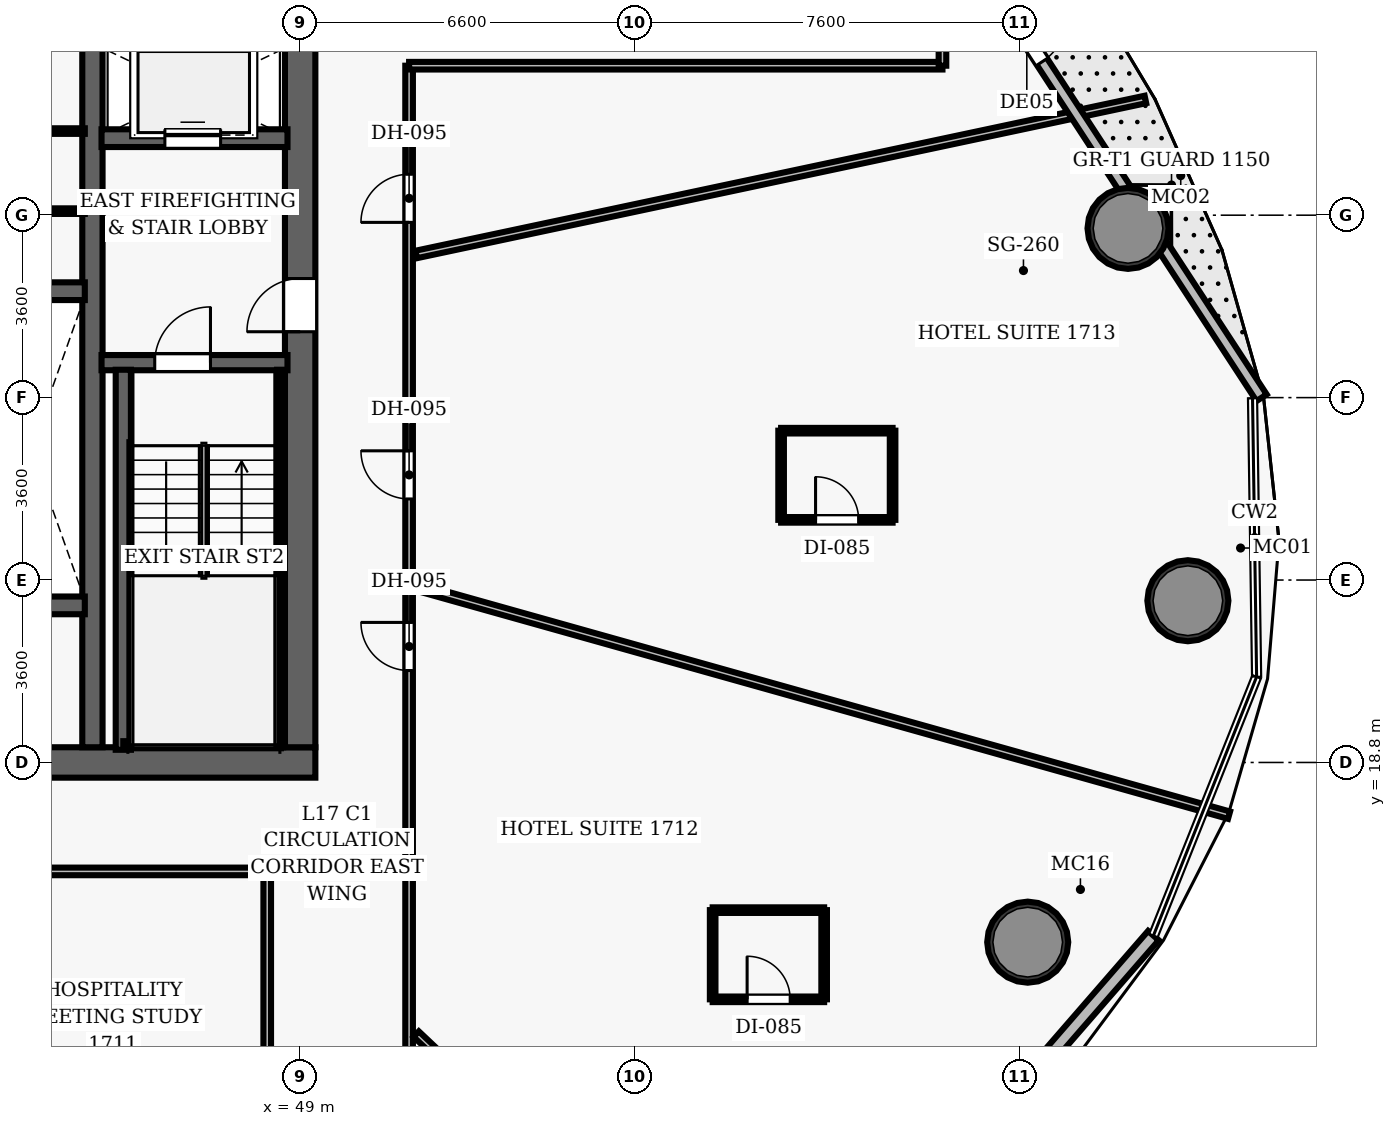
"""IFC4 building model, lengths in metres.
Left out: names, types, materials, properties, quantities, classifications, styles, units other than length and angle.
Written with IfcOpenShell. Run it as: python <this file> out.ifc"""

import sys

from ifc_helpers import new_model, si_unit, direction, frame, frame_2d, origin, origin_2d, place, context, subcontext, project, spatial, rectangle, hollow_circle, extrude, element, fill, save


model = new_model("IFC4")
c1 = context("Model", 3, precision=1e-05, world=origin(), true_north=direction((0.0, 1.0)))
c2 = subcontext(c1, "Body", "Model", "MODEL_VIEW")
j1 = project(units=[si_unit("LENGTHUNIT", "METRE"), si_unit("PLANEANGLEUNIT", "RADIAN")], contexts=[c1])
p1 = place(None, origin())
s1 = spatial("IfcSite", under=j1, at=p1, CompositionType="ELEMENT")
p2 = place(p1, origin())
s2 = spatial("IfcBuilding", under=s1, at=p2, CompositionType="ELEMENT")
p3 = place(p2, frame((0.0, 0.0, 76.4)))
s3 = spatial("IfcBuildingStorey", under=s2, at=p3, CompositionType="ELEMENT", Elevation=76.4)
p4 = place(p3, frame((26.7, 18.8, 0.0), z_axis=(0.0, 0.0, 1.0), x_axis=(1.0, 0.0, 0.0)))
e1 = element("IfcWall", 1, at=p4, inside=s3, PredefinedType="SHEAR", context=c2, shape_type="SweptSolid", body=[
    extrude(rectangle(XDim=22.6, YDim=0.6, at=frame_2d((11.3, 0.0))), origin(), (0.0, 0.0, 1.0), 3.5),
])
p5 = place(p4, frame((14.52, 0.0, 0.0)))
e2 = element("IfcOpeningElement", 2, at=p5, cuts=e1, PredefinedType="OPENING", context=c2, shape_type="SweptSolid", body=[
    extrude(rectangle(XDim=1.05, YDim=2.15, at=frame_2d((0.525, 1.075))), frame((0.0, 0.31, 0.0), z_axis=(0.0, -1.0, 0.0), x_axis=(1.0, 0.0, 0.0)), (0.0, 0.0, 1.0), 0.62),
])
p6 = place(p3, frame((49.0, 19.1, 0.0), z_axis=(0.0, 0.0, 1.0), x_axis=(0.0, 1.0, 0.0)))
e3 = element("IfcWall", 3, at=p6, inside=s3, PredefinedType="SHEAR", context=c2, shape_type="SweptSolid", body=[
    extrude(rectangle(XDim=13.8, YDim=0.6, at=frame_2d((6.9, 0.0))), origin(), (0.0, 0.0, 1.0), 3.5),
])
p7 = place(p6, frame((8.2, 0.0, 0.0)))
e4 = element("IfcOpeningElement", 4, at=p7, cuts=e3, PredefinedType="OPENING", context=c2, shape_type="SweptSolid", body=[
    extrude(rectangle(XDim=1.05, YDim=2.15, at=frame_2d((0.525, 1.075))), frame((0.0, 0.31, 0.0), z_axis=(0.0, -1.0, 0.0), x_axis=(1.0, 0.0, 0.0)), (0.0, 0.0, 1.0), 0.62),
])
p8 = place(p3, frame((44.9, 19.1, 0.0), z_axis=(0.0, 0.0, 1.0), x_axis=(0.0, 1.0, 0.0)))
e5 = element("IfcWall", 5, at=p8, inside=s3, PredefinedType="SHEAR", context=c2, shape_type="SweptSolid", body=[
    extrude(rectangle(XDim=13.8, YDim=0.4, at=frame_2d((6.9, 0.0))), origin(), (0.0, 0.0, 1.0), 3.5),
])
for number, where, z_axis, x_axis in (
    (6, (66.52, 21.992, 0.0), (0.0, 0.0, 1.0), (1.0, 0.0, 0.0)),
    (7, (65.339, 29.34, 0.0), (0.0, 0.0, 1.0), (1.0, 0.0, 0.0)),
    (8, (63.359, 15.254, 0.0), (0.0, 0.0, 1.0), (1.0, 0.0, 0.0)),
):
    element("IfcColumn", number, at=place(p3, frame(where, z_axis=z_axis, x_axis=x_axis)), inside=s3, PredefinedType="COLUMN", context=c2, shape_type="SweptSolid", body=[
        extrude(hollow_circle(Radius=0.8, WallThickness=0.06, at=origin_2d()), origin(), (0.0, 0.0, 1.0), 3.5),
    ])
p9 = place(p3, frame((45.08, 26.69, 0.0), z_axis=(0.0, 0.0, 1.0), x_axis=(1.0, 0.0, 0.0)))
e9 = element("IfcWall", 9, at=p9, inside=s3, PredefinedType="SHEAR", context=c2, shape_type="SweptSolid", body=[
    extrude(rectangle(XDim=3.67, YDim=0.3, at=frame_2d((1.835, 0.0))), origin(), (0.0, 0.0, 1.0), 3.5),
])
p10 = place(p9, frame((1.05, 0.0, 0.0)))
e10 = element("IfcOpeningElement", 10, at=p10, cuts=e9, PredefinedType="OPENING", context=c2, shape_type="SweptSolid", body=[
    extrude(rectangle(XDim=1.1, YDim=2.15, at=frame_2d((0.55, 1.075))), frame((0.0, 0.16, 0.0), z_axis=(0.0, -1.0, 0.0), x_axis=(1.0, 0.0, 0.0)), (0.0, 0.0, 1.0), 0.32),
])
p11 = place(p3, frame((45.51, 19.05, 0.0), z_axis=(0.0, 0.0, 1.0), x_axis=(0.0, 1.0, 0.0)))
e11 = element("IfcWall", 11, at=p11, inside=s3, PredefinedType="SHEAR", context=c2, shape_type="SweptSolid", body=[
    extrude(rectangle(XDim=7.5, YDim=0.3, at=frame_2d((3.75, 0.0))), origin(), (0.0, 0.0, 1.0), 3.5),
])
p12 = place(p3, frame((48.605, 19.1, 0.0), z_axis=(0.0, 0.0, 1.0), x_axis=(0.0, 1.0, 0.0)))
e12 = element("IfcWall", 12, at=p12, inside=s3, PredefinedType="SHEAR", context=c2, shape_type="SweptSolid", body=[
    extrude(rectangle(XDim=7.45, YDim=0.12, at=frame_2d((3.725, 0.0))), origin(), (0.0, 0.0, 1.0), 3.5),
])
p13 = place(p3, frame((45.51, 19.16, 0.0), z_axis=(0.0, 0.0, 1.0), x_axis=(1.0, 0.0, 0.0)))
e13 = element("IfcWall", 13, at=p13, inside=s3, PredefinedType="SHEAR", context=c2, shape_type="SweptSolid", body=[
    extrude(rectangle(XDim=3.095, YDim=0.12, at=frame_2d((1.547, 0.0))), origin(), (0.0, 0.0, 1.0), 3.5),
])
p14 = place(p3, frame((45.08, 31.12, 0.0), z_axis=(0.0, 0.0, 1.0), x_axis=(1.0, 0.0, 0.0)))
e14 = element("IfcWall", 14, at=p14, inside=s3, PredefinedType="SHEAR", context=c2, shape_type="SweptSolid", body=[
    extrude(rectangle(XDim=3.67, YDim=0.35, at=frame_2d((1.835, 0.0))), origin(), (0.0, 0.0, 1.0), 2.6),
])
p15 = place(p14, frame((1.25, 0.0, 0.0)))
e15 = element("IfcOpeningElement", 15, at=p15, cuts=e14, PredefinedType="OPENING", context=c2, shape_type="SweptSolid", body=[
    extrude(rectangle(XDim=1.1, YDim=2.15, at=frame_2d((0.55, 1.075))), frame((0.0, 0.185, 0.0), z_axis=(0.0, -1.0, 0.0), x_axis=(1.0, 0.0, 0.0)), (0.0, 0.0, 1.0), 0.37),
])
for number, where, z_axis, x_axis in (
    (16, (42.72, 21.9, 0.0), (0.0, 0.0, 1.0), (1.0, 0.0, 0.0)),
    (17, (42.72, 28.1, 0.0), (0.0, 0.0, 1.0), (1.0, 0.0, 0.0)),
):
    element("IfcWall", number, at=place(p3, frame(where, z_axis=z_axis, x_axis=x_axis)), inside=s3, PredefinedType="SHEAR", context=c2, shape_type="SweptSolid", body=[
        extrude(rectangle(XDim=2.03, YDim=0.35, at=frame_2d((1.015, 0.0))), origin(), (0.0, 0.0, 1.0), 2.6),
    ])
for number, where, z_axis, x_axis in (
    (18, (42.55, 29.68, 0.0), (0.0, 0.0, 1.0), (1.0, 0.0, 0.0)),
    (19, (42.55, 31.26, 0.0), (0.0, 0.0, 1.0), (1.0, 0.0, 0.0)),
):
    element("IfcWall", number, at=place(p3, frame(where, z_axis=z_axis, x_axis=x_axis)), inside=s3, PredefinedType="PARTITIONING", context=c2, shape_type="SweptSolid", body=[
        extrude(rectangle(XDim=2.2, YDim=0.11, at=frame_2d((1.1, 0.0))), origin(), (0.0, 0.0, 1.0), 2.6),
    ])
p16 = place(p3, frame((24.85, 16.65, 0.0), z_axis=(0.0, 0.0, 1.0), x_axis=(1.0, 0.0, 0.0)))
e20 = element("IfcWall", 20, at=p16, inside=s3, PredefinedType="PARTITIONING", context=c2, shape_type="SweptSolid", body=[
    extrude(rectangle(XDim=23.5, YDim=0.15, at=frame_2d((11.75, 0.0))), origin(), (0.0, 0.0, 1.0), 2.6),
])
p17 = place(p16, frame((4.362, 0.0, 0.0)))
e21 = element("IfcOpeningElement", 21, at=p17, cuts=e20, PredefinedType="OPENING", context=c2, shape_type="SweptSolid", body=[
    extrude(rectangle(XDim=0.95, YDim=2.15, at=frame_2d((0.475, 1.075))), frame((0.0, 0.085, 0.0), z_axis=(0.0, -1.0, 0.0), x_axis=(1.0, 0.0, 0.0)), (0.0, 0.0, 1.0), 0.17),
])
p18 = place(p16, frame((8.439, 0.0, 0.0)))
e22 = element("IfcOpeningElement", 22, at=p18, cuts=e20, PredefinedType="OPENING", context=c2, shape_type="SweptSolid", body=[
    extrude(rectangle(XDim=0.95, YDim=2.15, at=frame_2d((0.475, 1.075))), frame((0.0, 0.085, 0.0), z_axis=(0.0, -1.0, 0.0), x_axis=(1.0, 0.0, 0.0)), (0.0, 0.0, 1.0), 0.17),
])
p19 = place(p16, frame((14.893, 0.0, 0.0)))
e23 = element("IfcOpeningElement", 23, at=p19, cuts=e20, PredefinedType="OPENING", context=c2, shape_type="SweptSolid", body=[
    extrude(rectangle(XDim=0.95, YDim=2.15, at=frame_2d((0.475, 1.075))), frame((0.0, 0.085, 0.0), z_axis=(0.0, -1.0, 0.0), x_axis=(1.0, 0.0, 0.0)), (0.0, 0.0, 1.0), 0.17),
])
p20 = place(p16, frame((17.475, 0.0, 0.0)))
e24 = element("IfcOpeningElement", 24, at=p20, cuts=e20, PredefinedType="OPENING", context=c2, shape_type="SweptSolid", body=[
    extrude(rectangle(XDim=0.95, YDim=2.15, at=frame_2d((0.475, 1.075))), frame((0.0, 0.085, 0.0), z_axis=(0.0, -1.0, 0.0), x_axis=(1.0, 0.0, 0.0)), (0.0, 0.0, 1.0), 0.17),
])
p21 = place(p3, frame((51.15, 16.65, 0.0), z_axis=(0.0, 0.0, 1.0), x_axis=(0.0, 1.0, 0.0)))
e25 = element("IfcWall", 25, at=p21, inside=s3, PredefinedType="PARTITIONING", context=c2, shape_type="SweptSolid", body=[
    extrude(rectangle(XDim=15.9, YDim=0.15, at=frame_2d((7.95, 0.0))), origin(), (0.0, 0.0, 1.0), 2.6),
])
p22 = place(p21, frame((12.808, 0.0, 0.0)))
e26 = element("IfcOpeningElement", 26, at=p22, cuts=e25, PredefinedType="OPENING", context=c2, shape_type="SweptSolid", body=[
    extrude(rectangle(XDim=0.95, YDim=2.15, at=frame_2d((0.475, 1.075))), frame((0.0, 0.085, 0.0), z_axis=(0.0, -1.0, 0.0), x_axis=(1.0, 0.0, 0.0)), (0.0, 0.0, 1.0), 0.17),
])
p23 = place(p21, frame((3.964, 0.0, 0.0)))
e27 = element("IfcOpeningElement", 27, at=p23, cuts=e25, PredefinedType="OPENING", context=c2, shape_type="SweptSolid", body=[
    extrude(rectangle(XDim=0.95, YDim=2.15, at=frame_2d((0.475, 1.075))), frame((0.0, 0.085, 0.0), z_axis=(0.0, -1.0, 0.0), x_axis=(1.0, 0.0, 0.0)), (0.0, 0.0, 1.0), 0.17),
])
p24 = place(p21, frame((7.35, 0.0, 0.0)))
e28 = element("IfcOpeningElement", 28, at=p24, cuts=e25, PredefinedType="OPENING", context=c2, shape_type="SweptSolid", body=[
    extrude(rectangle(XDim=0.95, YDim=2.15, at=frame_2d((0.475, 1.075))), frame((0.0, 0.085, 0.0), z_axis=(0.0, -1.0, 0.0), x_axis=(1.0, 0.0, 0.0)), (0.0, 0.0, 1.0), 0.17),
])
p25 = place(p3, frame((51.15, 32.55, 0.0), z_axis=(0.0, 0.0, 1.0), x_axis=(1.0, 0.0, 0.0)))
e29 = element("IfcWall", 29, at=p25, inside=s3, PredefinedType="PARTITIONING", context=c2, shape_type="SweptSolid", body=[
    extrude(rectangle(XDim=10.526, YDim=0.15, at=frame_2d((5.263, 0.0))), origin(), (0.0, 0.0, 1.0), 2.6),
])
p26 = place(p3, frame((61.676, 32.55, 0.0), z_axis=(0.0, 0.0, 1.0), x_axis=(0.0, 1.0, 0.0)))
e30 = element("IfcWall", 30, at=p26, inside=s3, PredefinedType="PARTITIONING", context=c2, shape_type="SweptSolid", body=[
    extrude(rectangle(XDim=2.8, YDim=0.15, at=frame_2d((1.4, 0.0))), origin(), (0.0, 0.0, 1.0), 2.6),
])
for number, where, z_axis, x_axis in (
    (31, (48.35, 6.5, 0.0), (0.0, 0.0, 1.0), (0.0, 1.0, 0.0)),
    (32, (51.15, 6.5, 0.0), (0.0, 0.0, 1.0), (0.0, 1.0, 0.0)),
):
    element("IfcWall", number, at=place(p3, frame(where, z_axis=z_axis, x_axis=x_axis)), inside=s3, PredefinedType="PARTITIONING", context=c2, shape_type="SweptSolid", body=[
        extrude(rectangle(XDim=10.15, YDim=0.15, at=frame_2d((5.075, 0.0))), origin(), (0.0, 0.0, 1.0), 2.6),
    ])
p27 = place(p3, frame((51.29, 28.825, 0.0), z_axis=(0.0, 0.0, 1.0), x_axis=(0.978150246992, 0.207899240764, 0.0)))
e33 = element("IfcWall", 33, at=p27, inside=s3, PredefinedType="PARTITIONING", context=c2, shape_type="SweptSolid", body=[
    extrude(rectangle(XDim=14.713, YDim=0.15, at=frame_2d((7.356, 0.0))), origin(), (0.0, 0.0, 1.0), 2.6),
])
p28 = place(p3, frame((41.253, 16.51, 0.0), z_axis=(0.0, 0.0, 1.0), x_axis=(0.324297168355, -0.945955256128, 0.0)))
e34 = element("IfcWall", 34, at=p28, inside=s3, PredefinedType="PARTITIONING", context=c2, shape_type="SweptSolid", body=[
    extrude(rectangle(XDim=14.71, YDim=0.15, at=frame_2d((7.355, 0.0))), origin(), (0.0, 0.0, 1.0), 2.6),
])
p29 = place(p3, frame((51.29, 13.439, 0.0), z_axis=(0.0, 0.0, 1.0), x_axis=(0.726754697613, -0.686897087996, 0.0)))
e35 = element("IfcWall", 35, at=p29, inside=s3, PredefinedType="PARTITIONING", context=c2, shape_type="SweptSolid", body=[
    extrude(rectangle(XDim=8.778, YDim=0.15, at=frame_2d((4.389, 0.0))), origin(), (0.0, 0.0, 1.0), 2.6),
])
p30 = place(p3, frame((51.29, 22.266, 0.0), z_axis=(0.0, 0.0, 1.0), x_axis=(0.962729778271, -0.270465106863, 0.0)))
e36 = element("IfcWall", 36, at=p30, inside=s3, PredefinedType="PARTITIONING", context=c2, shape_type="SweptSolid", body=[
    extrude(rectangle(XDim=16.663, YDim=0.15, at=frame_2d((8.332, 0.0))), origin(), (0.0, 0.0, 1.0), 2.6),
])
p31 = place(p3, frame((57.141, 14.126, 0.0), z_axis=(0.0, 0.0, 1.0), x_axis=(1.0, 0.0, 0.0)))
e37 = element("IfcWall", 37, at=p31, inside=s3, PredefinedType="PARTITIONING", context=c2, shape_type="SweptSolid", body=[
    extrude(rectangle(XDim=2.2, YDim=0.11, at=frame_2d((1.1, 0.0))), origin(), (0.0, 0.0, 1.0), 2.6),
])
p32 = place(p31, frame((0.68, 0.0, 0.0)))
e38 = element("IfcOpeningElement", 38, at=p32, cuts=e37, PredefinedType="OPENING", context=c2, shape_type="SweptSolid", body=[
    extrude(rectangle(XDim=0.85, YDim=2.1, at=frame_2d((0.425, 1.05))), frame((0.0, 0.065, 0.0), z_axis=(0.0, -1.0, 0.0), x_axis=(1.0, 0.0, 0.0)), (0.0, 0.0, 1.0), 0.13),
])
p33 = place(p3, frame((57.141, 15.886, 0.0), z_axis=(0.0, 0.0, 1.0), x_axis=(1.0, 0.0, 0.0)))
e39 = element("IfcWall", 39, at=p33, inside=s3, PredefinedType="PARTITIONING", context=c2, shape_type="SweptSolid", body=[
    extrude(rectangle(XDim=2.2, YDim=0.11, at=frame_2d((1.1, 0.0))), origin(), (0.0, 0.0, 1.0), 2.6),
])
for number, where, z_axis, x_axis in (
    (40, (57.141, 14.126, 0.0), (0.0, 0.0, 1.0), (0.0, 1.0, 0.0)),
    (41, (59.341, 14.126, 0.0), (0.0, 0.0, 1.0), (0.0, 1.0, 0.0)),
):
    element("IfcWall", number, at=place(p3, frame(where, z_axis=z_axis, x_axis=x_axis)), inside=s3, PredefinedType="PARTITIONING", context=c2, shape_type="SweptSolid", body=[
        extrude(rectangle(XDim=1.76, YDim=0.11, at=frame_2d((0.88, 0.0))), origin(), (0.0, 0.0, 1.0), 2.6),
    ])
p34 = place(p3, frame((58.492, 23.587, 0.0), z_axis=(0.0, 0.0, 1.0), x_axis=(1.0, 0.0, 0.0)))
e42 = element("IfcWall", 42, at=p34, inside=s3, PredefinedType="PARTITIONING", context=c2, shape_type="SweptSolid", body=[
    extrude(rectangle(XDim=2.2, YDim=0.11, at=frame_2d((1.1, 0.0))), origin(), (0.0, 0.0, 1.0), 2.6),
])
p35 = place(p34, frame((0.68, 0.0, 0.0)))
e43 = element("IfcOpeningElement", 43, at=p35, cuts=e42, PredefinedType="OPENING", context=c2, shape_type="SweptSolid", body=[
    extrude(rectangle(XDim=0.85, YDim=2.1, at=frame_2d((0.425, 1.05))), frame((0.0, 0.065, 0.0), z_axis=(0.0, -1.0, 0.0), x_axis=(1.0, 0.0, 0.0)), (0.0, 0.0, 1.0), 0.13),
])
p36 = place(p3, frame((58.492, 25.347, 0.0), z_axis=(0.0, 0.0, 1.0), x_axis=(1.0, 0.0, 0.0)))
e44 = element("IfcWall", 44, at=p36, inside=s3, PredefinedType="PARTITIONING", context=c2, shape_type="SweptSolid", body=[
    extrude(rectangle(XDim=2.2, YDim=0.11, at=frame_2d((1.1, 0.0))), origin(), (0.0, 0.0, 1.0), 2.6),
])
for number, where, z_axis, x_axis in (
    (45, (58.492, 23.587, 0.0), (0.0, 0.0, 1.0), (0.0, 1.0, 0.0)),
    (46, (60.692, 23.587, 0.0), (0.0, 0.0, 1.0), (0.0, 1.0, 0.0)),
):
    element("IfcWall", number, at=place(p3, frame(where, z_axis=z_axis, x_axis=x_axis)), inside=s3, PredefinedType="PARTITIONING", context=c2, shape_type="SweptSolid", body=[
        extrude(rectangle(XDim=1.76, YDim=0.11, at=frame_2d((0.88, 0.0))), origin(), (0.0, 0.0, 1.0), 2.6),
    ])
p37 = place(p3, frame((60.603, 37.276, 0.0), z_axis=(0.0, 0.0, 1.0), x_axis=(0.547121449086, -0.837053236031, 0.0)))
e47 = element("IfcWall", 47, at=p37, inside=s3, PredefinedType="SOLIDWALL", context=c2, shape_type="SweptSolid", body=[
    extrude(rectangle(XDim=13.474, YDim=0.24, at=frame_2d((6.737, 0.0))), origin(), (0.0, 0.0, 1.0), 2.45),
])
p38 = place(p37, frame((4.455, 0.0, 0.0)))
e48 = element("IfcOpeningElement", 48, at=p38, cuts=e47, PredefinedType="OPENING", context=c2, shape_type="SweptSolid", body=[
    extrude(rectangle(XDim=1.1, YDim=2.2, at=frame_2d((0.55, 1.1))), frame((0.0, 0.13, 0.0), z_axis=(0.0, -1.0, 0.0), x_axis=(1.0, 0.0, 0.0)), (0.0, 0.0, 1.0), 0.26),
])
p39 = place(p3, frame((65.84, 15.383, 0.0), z_axis=(0.0, 0.0, 1.0), x_axis=(-0.655684297122, -0.755035166405, 0.0)))
e49 = element("IfcWall", 49, at=p39, inside=s3, PredefinedType="SOLIDWALL", context=c2, shape_type="SweptSolid", body=[
    extrude(rectangle(XDim=6.212, YDim=0.28, at=frame_2d((3.106, 0.0))), origin(), (0.0, 0.0, 1.0), 3.25),
])
p40 = place(p10, origin())
e50 = element("IfcDoor", 50, at=p40, inside=s3, OperationType="SINGLE_SWING_RIGHT", PredefinedType="DOOR", context=c2, shape_type="SweptSolid", body=[
    extrude(rectangle(XDim=1.1, YDim=2.15, at=frame_2d((0.55, 1.075))), frame((0.0, 0.025, 0.0), z_axis=(0.0, -1.0, 0.0), x_axis=(1.0, 0.0, 0.0)), (0.0, 0.0, 1.0), 0.05),
])
fill(e10, e50)
p41 = place(p7, origin())
e51 = element("IfcDoor", 51, at=p41, inside=s3, OperationType="SINGLE_SWING_LEFT", PredefinedType="DOOR", context=c2, shape_type="SweptSolid", body=[
    extrude(rectangle(XDim=1.05, YDim=2.15, at=frame_2d((0.525, 1.075))), frame((0.0, 0.025, 0.0), z_axis=(0.0, -1.0, 0.0), x_axis=(1.0, 0.0, 0.0)), (0.0, 0.0, 1.0), 0.05),
])
fill(e4, e51)
p42 = place(p22, origin())
e52 = element("IfcDoor", 52, at=p42, inside=s3, OperationType="SINGLE_SWING_LEFT", PredefinedType="DOOR", context=c2, shape_type="SweptSolid", body=[
    extrude(rectangle(XDim=0.95, YDim=2.15, at=frame_2d((0.475, 1.075))), frame((0.0, 0.025, 0.0), z_axis=(0.0, -1.0, 0.0), x_axis=(1.0, 0.0, 0.0)), (0.0, 0.0, 1.0), 0.05),
])
fill(e26, e52)
p43 = place(p23, origin())
e53 = element("IfcDoor", 53, at=p43, inside=s3, OperationType="SINGLE_SWING_RIGHT", PredefinedType="DOOR", context=c2, shape_type="SweptSolid", body=[
    extrude(rectangle(XDim=0.95, YDim=2.15, at=frame_2d((0.475, 1.075))), frame((0.0, 0.025, 0.0), z_axis=(0.0, -1.0, 0.0), x_axis=(1.0, 0.0, 0.0)), (0.0, 0.0, 1.0), 0.05),
])
fill(e27, e53)
p44 = place(p32, origin())
e54 = element("IfcDoor", 54, at=p44, inside=s3, OperationType="SINGLE_SWING_LEFT", PredefinedType="DOOR", context=c2, shape_type="SweptSolid", body=[
    extrude(rectangle(XDim=0.85, YDim=2.1, at=frame_2d((0.425, 1.05))), frame((0.0, 0.025, 0.0), z_axis=(0.0, -1.0, 0.0), x_axis=(1.0, 0.0, 0.0)), (0.0, 0.0, 1.0), 0.05),
])
fill(e38, e54)
p45 = place(p24, origin())
e55 = element("IfcDoor", 55, at=p45, inside=s3, OperationType="SINGLE_SWING_RIGHT", PredefinedType="DOOR", context=c2, shape_type="SweptSolid", body=[
    extrude(rectangle(XDim=0.95, YDim=2.15, at=frame_2d((0.475, 1.075))), frame((0.0, 0.025, 0.0), z_axis=(0.0, -1.0, 0.0), x_axis=(1.0, 0.0, 0.0)), (0.0, 0.0, 1.0), 0.05),
])
fill(e28, e55)
p46 = place(p35, origin())
e56 = element("IfcDoor", 56, at=p46, inside=s3, OperationType="SINGLE_SWING_LEFT", PredefinedType="DOOR", context=c2, shape_type="SweptSolid", body=[
    extrude(rectangle(XDim=0.85, YDim=2.1, at=frame_2d((0.425, 1.05))), frame((0.0, 0.025, 0.0), z_axis=(0.0, -1.0, 0.0), x_axis=(1.0, 0.0, 0.0)), (0.0, 0.0, 1.0), 0.05),
])
fill(e43, e56)
p47 = place(p15, origin())
e57 = element("IfcDoor", 57, at=p47, inside=s3, OperationType="SLIDING_TO_LEFT", PredefinedType="DOOR", context=c2, shape_type="SweptSolid", body=[
    extrude(rectangle(XDim=1.1, YDim=2.15, at=frame_2d((0.55, 1.075))), frame((0.0, 0.025, 0.0), z_axis=(0.0, -1.0, 0.0), x_axis=(1.0, 0.0, 0.0)), (0.0, 0.0, 1.0), 0.05),
])
fill(e15, e57)
p48 = place(p38, origin())
e58 = element("IfcDoor", 58, at=p48, inside=s3, OperationType="SINGLE_SWING_LEFT", PredefinedType="DOOR", context=c2, shape_type="SweptSolid", body=[
    extrude(rectangle(XDim=1.1, YDim=2.2, at=frame_2d((0.55, 1.1))), frame((0.0, 0.025, 0.0), z_axis=(0.0, -1.0, 0.0), x_axis=(1.0, 0.0, 0.0)), (0.0, 0.0, 1.0), 0.05),
])
fill(e48, e58)
save(model, sys.argv[1])
